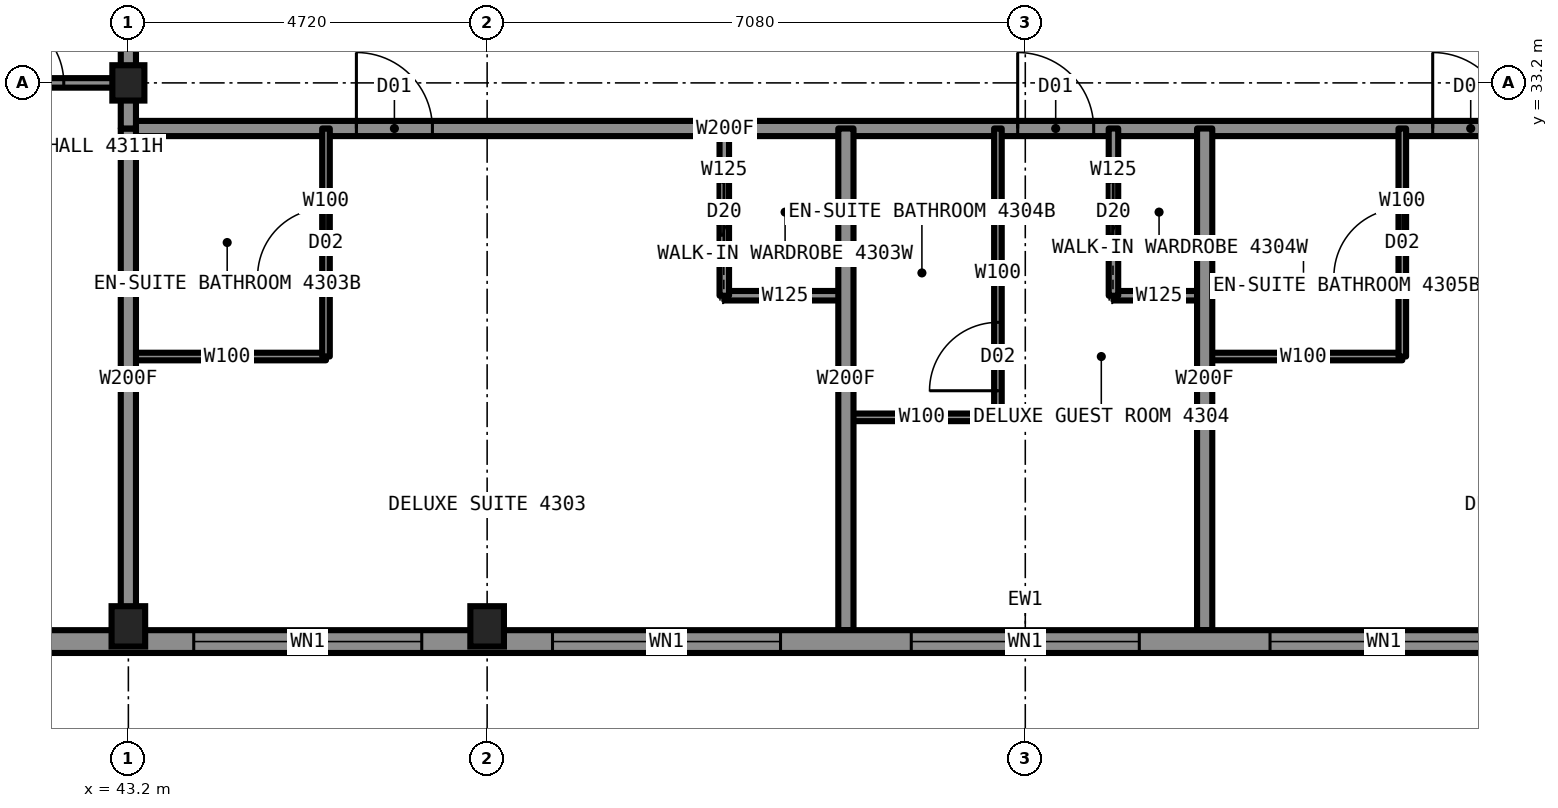
"""IFC4 building model, lengths in metres.
Left out: names, types, materials, properties, quantities, classifications, styles, units other than length and angle.
Written with IfcOpenShell. Run it as: python <this file> out.ifc"""

import sys

from ifc_helpers import new_model, si_unit, direction, frame, frame_2d, origin, origin_2d, place, context, subcontext, project, spatial, rectangle, i_section, extrude, element, fill, save


model = new_model("IFC4")
c1 = context("Model", 3, precision=1e-05, world=origin(), true_north=direction((0.0, 1.0)))
c2 = subcontext(c1, "Body", "Model", "MODEL_VIEW")
j1 = project(units=[si_unit("LENGTHUNIT", "METRE"), si_unit("PLANEANGLEUNIT", "RADIAN")], contexts=[c1])
p1 = place(None, origin())
s1 = spatial("IfcSite", under=j1, at=p1, CompositionType="ELEMENT")
p2 = place(p1, origin())
s2 = spatial("IfcBuilding", under=s1, at=p2, CompositionType="ELEMENT")
p3 = place(p2, frame((0.0, 0.0, 161.8)))
s3 = spatial("IfcBuildingStorey", under=s2, at=p3, CompositionType="ELEMENT", Elevation=161.8)
for number, where, z_axis, x_axis in (
    (1, (43.2, 26.05, 0.0), (0.0, 0.0, 1.0), (1.0, 0.0, 0.0)),
    (2, (47.92, 26.05, 0.0), (0.0, 0.0, 1.0), (1.0, 0.0, 0.0)),
):
    element("IfcColumn", number, at=place(p3, frame(where, z_axis=z_axis, x_axis=x_axis)), inside=s3, PredefinedType="COLUMN", context=c2, shape_type="SweptSolid", body=[
        extrude(i_section(OverallWidth=0.442, OverallDepth=0.531, WebThickness=0.066, FlangeThickness=0.106, at=origin_2d()), origin(), (0.0, 0.0, 1.0), 3.5),
    ])
p4 = place(p3, frame((43.2, 33.2, 0.0), z_axis=(0.0, 0.0, 1.0), x_axis=(1.0, 0.0, 0.0)))
e3 = element("IfcColumn", 3, at=p4, inside=s3, PredefinedType="COLUMN", context=c2, shape_type="SweptSolid", body=[
    extrude(i_section(OverallWidth=0.422, OverallDepth=0.465, WebThickness=0.045, FlangeThickness=0.073, at=origin_2d()), origin(), (0.0, 0.0, 1.0), 3.5),
])
p5 = place(p3, frame((36.0, 33.2, 0.0), z_axis=(0.0, 0.0, 1.0), x_axis=(1.0, 0.0, 0.0)))
e4 = element("IfcWall", 4, at=p5, inside=s3, PredefinedType="PARTITIONING", context=c2, shape_type="SweptSolid", body=[
    extrude(rectangle(XDim=7.2, YDim=0.125, at=frame_2d((3.6, 0.0))), origin(), (0.0, 0.0, 1.0), 2.573),
])
p6 = place(p5, frame((5.45, 0.0, 0.0)))
e5 = element("IfcOpeningElement", 5, at=p6, cuts=e4, PredefinedType="OPENING", context=c2, shape_type="SweptSolid", body=[
    extrude(rectangle(XDim=0.9, YDim=2.2, at=frame_2d((0.45, 1.1))), frame((0.0, 0.073, 0.0), z_axis=(0.0, -1.0, 0.0), x_axis=(1.0, 0.0, 0.0)), (0.0, 0.0, 1.0), 0.145),
])
p7 = place(p3, frame((43.2, 32.6, 0.0), z_axis=(0.0, 0.0, 1.0), x_axis=(1.0, 0.0, 0.0)))
e6 = element("IfcWall", 6, at=p7, inside=s3, PredefinedType="PARTITIONING", context=c2, shape_type="SweptSolid", body=[
    extrude(rectangle(XDim=23.6, YDim=0.2, at=frame_2d((11.8, 0.0))), origin(), (0.0, 0.0, 1.0), 3.33),
])
p8 = place(p7, frame((3.0, 0.0, 0.0)))
e7 = element("IfcOpeningElement", 7, at=p8, cuts=e6, PredefinedType="OPENING", context=c2, shape_type="SweptSolid", body=[
    extrude(rectangle(XDim=1.0, YDim=2.2, at=frame_2d((0.5, 1.1))), frame((0.0, 0.11, 0.0), z_axis=(0.0, -1.0, 0.0), x_axis=(1.0, 0.0, 0.0)), (0.0, 0.0, 1.0), 0.22),
])
p9 = place(p7, frame((11.7, 0.0, 0.0)))
e8 = element("IfcOpeningElement", 8, at=p9, cuts=e6, PredefinedType="OPENING", context=c2, shape_type="SweptSolid", body=[
    extrude(rectangle(XDim=1.0, YDim=2.2, at=frame_2d((0.5, 1.1))), frame((0.0, 0.11, 0.0), z_axis=(0.0, -1.0, 0.0), x_axis=(1.0, 0.0, 0.0)), (0.0, 0.0, 1.0), 0.22),
])
p10 = place(p7, frame((17.16, 0.0, 0.0)))
e9 = element("IfcOpeningElement", 9, at=p10, cuts=e6, PredefinedType="OPENING", context=c2, shape_type="SweptSolid", body=[
    extrude(rectangle(XDim=1.0, YDim=2.2, at=frame_2d((0.5, 1.1))), frame((0.0, 0.11, 0.0), z_axis=(0.0, -1.0, 0.0), x_axis=(1.0, 0.0, 0.0)), (0.0, 0.0, 1.0), 0.22),
])
p11 = place(p3, frame((51.04, 30.4, 0.0), z_axis=(0.0, 0.0, 1.0), x_axis=(1.0, 0.0, 0.0)))
e10 = element("IfcWall", 10, at=p11, inside=s3, PredefinedType="PARTITIONING", context=c2, shape_type="SweptSolid", body=[
    extrude(rectangle(XDim=1.6, YDim=0.125, at=frame_2d((0.8, 0.0))), origin(), (0.0, 0.0, 1.0), 3.33),
])
p12 = place(p3, frame((56.16, 30.4, 0.0), z_axis=(0.0, 0.0, 1.0), x_axis=(1.0, 0.0, 0.0)))
e11 = element("IfcWall", 11, at=p12, inside=s3, PredefinedType="PARTITIONING", context=c2, shape_type="SweptSolid", body=[
    extrude(rectangle(XDim=1.2, YDim=0.125, at=frame_2d((0.6, 0.0))), origin(), (0.0, 0.0, 1.0), 3.33),
])
p13 = place(p3, frame((43.2, 29.6, 0.0), z_axis=(0.0, 0.0, 1.0), x_axis=(1.0, 0.0, 0.0)))
e12 = element("IfcWall", 12, at=p13, inside=s3, PredefinedType="PARTITIONING", context=c2, shape_type="SweptSolid", body=[
    extrude(rectangle(XDim=2.6, YDim=0.1, at=frame_2d((1.3, 0.0))), origin(), (0.0, 0.0, 1.0), 3.33),
])
p14 = place(p3, frame((57.36, 29.6, 0.0), z_axis=(0.0, 0.0, 1.0), x_axis=(1.0, 0.0, 0.0)))
e13 = element("IfcWall", 13, at=p14, inside=s3, PredefinedType="PARTITIONING", context=c2, shape_type="SweptSolid", body=[
    extrude(rectangle(XDim=2.6, YDim=0.1, at=frame_2d((1.3, 0.0))), origin(), (0.0, 0.0, 1.0), 3.33),
])
p15 = place(p3, frame((52.64, 28.8, 0.0), z_axis=(0.0, 0.0, 1.0), x_axis=(1.0, 0.0, 0.0)))
e14 = element("IfcWall", 14, at=p15, inside=s3, PredefinedType="PARTITIONING", context=c2, shape_type="SweptSolid", body=[
    extrude(rectangle(XDim=2.0, YDim=0.1, at=frame_2d((1.0, 0.0))), origin(), (0.0, 0.0, 1.0), 3.33),
])
p16 = place(p3, frame((54.64, 28.8, 0.0), z_axis=(0.0, 0.0, 1.0), x_axis=(0.0, 1.0, 0.0)))
e15 = element("IfcWall", 15, at=p16, inside=s3, PredefinedType="PARTITIONING", context=c2, shape_type="SweptSolid", body=[
    extrude(rectangle(XDim=3.8, YDim=0.1, at=frame_2d((1.9, 0.0))), origin(), (0.0, 0.0, 1.0), 3.33),
])
p17 = place(p16, frame((0.35, 0.0, 0.0)))
e16 = element("IfcOpeningElement", 16, at=p17, cuts=e15, PredefinedType="OPENING", context=c2, shape_type="SweptSolid", body=[
    extrude(rectangle(XDim=0.9, YDim=2.1, at=frame_2d((0.45, 1.05))), frame((0.0, 0.06, 0.0), z_axis=(0.0, -1.0, 0.0), x_axis=(1.0, 0.0, 0.0)), (0.0, 0.0, 1.0), 0.12),
])
p18 = place(p3, frame((43.2, 33.22, 0.0), z_axis=(0.0, 0.0, 1.0), x_axis=(0.0, 1.0, 0.0)))
e17 = element("IfcWall", 17, at=p18, inside=s3, PredefinedType="PARTITIONING", context=c2, shape_type="SweptSolid", body=[
    extrude(rectangle(XDim=23.56, YDim=0.2, at=frame_2d((11.78, 0.0))), origin(), (0.0, 0.0, 1.0), 3.33),
])
p19 = place(p18, frame((15.6, 0.0, 0.0)))
e18 = element("IfcOpeningElement", 18, at=p19, cuts=e17, PredefinedType="OPENING", context=c2, shape_type="SweptSolid", body=[
    extrude(rectangle(XDim=1.0, YDim=2.2, at=frame_2d((0.5, 1.1))), frame((0.0, 0.11, 0.0), z_axis=(0.0, -1.0, 0.0), x_axis=(1.0, 0.0, 0.0)), (0.0, 0.0, 1.0), 0.22),
])
p20 = place(p18, frame((22.03, 0.0, 0.0)))
e19 = element("IfcOpeningElement", 19, at=p20, cuts=e17, PredefinedType="OPENING", context=c2, shape_type="SweptSolid", body=[
    extrude(rectangle(XDim=1.1, YDim=2.2, at=frame_2d((0.55, 1.1))), frame((0.0, 0.11, 0.0), z_axis=(0.0, -1.0, 0.0), x_axis=(1.0, 0.0, 0.0)), (0.0, 0.0, 1.0), 0.22),
])
p21 = place(p18, frame((0.64, 0.0, 0.0)))
e20 = element("IfcOpeningElement", 20, at=p21, cuts=e17, PredefinedType="OPENING", context=c2, shape_type="SweptSolid", body=[
    extrude(rectangle(XDim=1.1, YDim=2.2, at=frame_2d((0.55, 1.1))), frame((0.0, 0.11, 0.0), z_axis=(0.0, -1.0, 0.0), x_axis=(1.0, 0.0, 0.0)), (0.0, 0.0, 1.0), 0.22),
])
p22 = place(p18, frame((7.45, 0.0, 0.0)))
e21 = element("IfcOpeningElement", 21, at=p22, cuts=e17, PredefinedType="OPENING", context=c2, shape_type="SweptSolid", body=[
    extrude(rectangle(XDim=2.0, YDim=2.4, at=frame_2d((1.0, 1.2))), frame((0.0, 0.11, 0.0), z_axis=(0.0, -1.0, 0.0), x_axis=(1.0, 0.0, 0.0)), (0.0, 0.0, 1.0), 0.22),
])
p23 = place(p18, frame((5.4, 0.0, 0.0)))
e22 = element("IfcOpeningElement", 22, at=p23, cuts=e17, PredefinedType="OPENING", context=c2, shape_type="SweptSolid", body=[
    extrude(rectangle(XDim=1.0, YDim=2.1, at=frame_2d((0.5, 1.05))), frame((0.0, 0.11, 0.0), z_axis=(0.0, -1.0, 0.0), x_axis=(1.0, 0.0, 0.0)), (0.0, 0.0, 1.0), 0.22),
])
p24 = place(p3, frame((43.2, 26.0, 0.0), z_axis=(0.0, 0.0, 1.0), x_axis=(0.0, 1.0, 0.0)))
e23 = element("IfcWall", 23, at=p24, inside=s3, PredefinedType="PARTITIONING", context=c2, shape_type="SweptSolid", body=[
    extrude(rectangle(XDim=6.6, YDim=0.2, at=frame_2d((3.3, 0.0))), origin(), (0.0, 0.0, 1.0), 2.573),
])
p25 = place(p3, frame((52.64, 26.0, 0.0), z_axis=(0.0, 0.0, 1.0), x_axis=(0.0, 1.0, 0.0)))
e24 = element("IfcWall", 24, at=p25, inside=s3, PredefinedType="PARTITIONING", context=c2, shape_type="SweptSolid", body=[
    extrude(rectangle(XDim=6.6, YDim=0.2, at=frame_2d((3.3, 0.0))), origin(), (0.0, 0.0, 1.0), 3.33),
])
p26 = place(p3, frame((51.04, 30.4, 0.0), z_axis=(0.0, 0.0, 1.0), x_axis=(0.0, 1.0, 0.0)))
e25 = element("IfcWall", 25, at=p26, inside=s3, PredefinedType="PARTITIONING", context=c2, shape_type="SweptSolid", body=[
    extrude(rectangle(XDim=2.2, YDim=0.125, at=frame_2d((1.1, 0.0))), origin(), (0.0, 0.0, 1.0), 3.33),
])
p27 = place(p26, frame((0.7, 0.0, 0.0)))
e26 = element("IfcOpeningElement", 26, at=p27, cuts=e25, PredefinedType="OPENING", context=c2, shape_type="SweptSolid", body=[
    extrude(rectangle(XDim=0.8, YDim=2.1, at=frame_2d((0.4, 1.05))), frame((0.0, 0.073, 0.0), z_axis=(0.0, -1.0, 0.0), x_axis=(1.0, 0.0, 0.0)), (0.0, 0.0, 1.0), 0.145),
])
p28 = place(p3, frame((45.8, 29.6, 0.0), z_axis=(0.0, 0.0, 1.0), x_axis=(0.0, 1.0, 0.0)))
e27 = element("IfcWall", 27, at=p28, inside=s3, PredefinedType="PARTITIONING", context=c2, shape_type="SweptSolid", body=[
    extrude(rectangle(XDim=3.0, YDim=0.1, at=frame_2d((1.5, 0.0))), origin(), (0.0, 0.0, 1.0), 3.33),
])
p29 = place(p28, frame((1.05, 0.0, 0.0)))
e28 = element("IfcOpeningElement", 28, at=p29, cuts=e27, PredefinedType="OPENING", context=c2, shape_type="SweptSolid", body=[
    extrude(rectangle(XDim=0.9, YDim=2.1, at=frame_2d((0.45, 1.05))), frame((0.0, 0.06, 0.0), z_axis=(0.0, -1.0, 0.0), x_axis=(1.0, 0.0, 0.0)), (0.0, 0.0, 1.0), 0.12),
])
p30 = place(p3, frame((56.16, 30.4, 0.0), z_axis=(0.0, 0.0, 1.0), x_axis=(0.0, 1.0, 0.0)))
e29 = element("IfcWall", 29, at=p30, inside=s3, PredefinedType="PARTITIONING", context=c2, shape_type="SweptSolid", body=[
    extrude(rectangle(XDim=2.2, YDim=0.125, at=frame_2d((1.1, 0.0))), origin(), (0.0, 0.0, 1.0), 3.33),
])
p31 = place(p30, frame((0.7, 0.0, 0.0)))
e30 = element("IfcOpeningElement", 30, at=p31, cuts=e29, PredefinedType="OPENING", context=c2, shape_type="SweptSolid", body=[
    extrude(rectangle(XDim=0.8, YDim=2.1, at=frame_2d((0.4, 1.05))), frame((0.0, 0.073, 0.0), z_axis=(0.0, -1.0, 0.0), x_axis=(1.0, 0.0, 0.0)), (0.0, 0.0, 1.0), 0.145),
])
p32 = place(p3, frame((57.36, 26.0, 0.0), z_axis=(0.0, 0.0, 1.0), x_axis=(0.0, 1.0, 0.0)))
e31 = element("IfcWall", 31, at=p32, inside=s3, PredefinedType="PARTITIONING", context=c2, shape_type="SweptSolid", body=[
    extrude(rectangle(XDim=6.6, YDim=0.2, at=frame_2d((3.3, 0.0))), origin(), (0.0, 0.0, 1.0), 3.33),
])
p33 = place(p3, frame((59.96, 29.6, 0.0), z_axis=(0.0, 0.0, 1.0), x_axis=(0.0, 1.0, 0.0)))
e32 = element("IfcWall", 32, at=p33, inside=s3, PredefinedType="PARTITIONING", context=c2, shape_type="SweptSolid", body=[
    extrude(rectangle(XDim=3.0, YDim=0.1, at=frame_2d((1.5, 0.0))), origin(), (0.0, 0.0, 1.0), 3.33),
])
p34 = place(p33, frame((1.05, 0.0, 0.0)))
e33 = element("IfcOpeningElement", 33, at=p34, cuts=e32, PredefinedType="OPENING", context=c2, shape_type="SweptSolid", body=[
    extrude(rectangle(XDim=0.9, YDim=2.1, at=frame_2d((0.45, 1.05))), frame((0.0, 0.06, 0.0), z_axis=(0.0, -1.0, 0.0), x_axis=(1.0, 0.0, 0.0)), (0.0, 0.0, 1.0), 0.12),
])
p35 = place(p3, frame((41.2, 25.85, 0.0), z_axis=(0.0, 0.0, 1.0), x_axis=(1.0, 0.0, 0.0)))
e34 = element("IfcWall", 34, at=p35, inside=s3, PredefinedType="SOLIDWALL", context=c2, shape_type="SweptSolid", body=[
    extrude(rectangle(XDim=27.6, YDim=0.3, at=frame_2d((13.8, 0.0))), origin(), (0.0, 0.0, 1.0), 2.83),
])
p36 = place(p35, frame((2.86, 0.0, 0.3)))
e35 = element("IfcOpeningElement", 35, at=p36, cuts=e34, PredefinedType="OPENING", context=c2, shape_type="SweptSolid", body=[
    extrude(rectangle(XDim=3.0, YDim=2.0, at=frame_2d((1.5, 1.0))), frame((0.0, 0.16, 0.0), z_axis=(0.0, -1.0, 0.0), x_axis=(1.0, 0.0, 0.0)), (0.0, 0.0, 1.0), 0.32),
])
p37 = place(p35, frame((7.58, 0.0, 0.3)))
e36 = element("IfcOpeningElement", 36, at=p37, cuts=e34, PredefinedType="OPENING", context=c2, shape_type="SweptSolid", body=[
    extrude(rectangle(XDim=3.0, YDim=2.0, at=frame_2d((1.5, 1.0))), frame((0.0, 0.16, 0.0), z_axis=(0.0, -1.0, 0.0), x_axis=(1.0, 0.0, 0.0)), (0.0, 0.0, 1.0), 0.32),
])
p38 = place(p35, frame((12.3, 0.0, 0.3)))
e37 = element("IfcOpeningElement", 37, at=p38, cuts=e34, PredefinedType="OPENING", context=c2, shape_type="SweptSolid", body=[
    extrude(rectangle(XDim=3.0, YDim=2.0, at=frame_2d((1.5, 1.0))), frame((0.0, 0.16, 0.0), z_axis=(0.0, -1.0, 0.0), x_axis=(1.0, 0.0, 0.0)), (0.0, 0.0, 1.0), 0.32),
])
p39 = place(p35, frame((17.02, 0.0, 0.3)))
e38 = element("IfcOpeningElement", 38, at=p39, cuts=e34, PredefinedType="OPENING", context=c2, shape_type="SweptSolid", body=[
    extrude(rectangle(XDim=3.0, YDim=2.0, at=frame_2d((1.5, 1.0))), frame((0.0, 0.16, 0.0), z_axis=(0.0, -1.0, 0.0), x_axis=(1.0, 0.0, 0.0)), (0.0, 0.0, 1.0), 0.32),
])
p40 = place(p35, frame((21.74, 0.0, 0.3)))
e39 = element("IfcOpeningElement", 39, at=p40, cuts=e34, PredefinedType="OPENING", context=c2, shape_type="SweptSolid", body=[
    extrude(rectangle(XDim=3.0, YDim=2.0, at=frame_2d((1.5, 1.0))), frame((0.0, 0.16, 0.0), z_axis=(0.0, -1.0, 0.0), x_axis=(1.0, 0.0, 0.0)), (0.0, 0.0, 1.0), 0.32),
])
p41 = place(p3, frame((43.2, 32.6, 0.0), z_axis=(0.0, 0.0, 1.0), x_axis=(0.0, 1.0, 0.0)))
e40 = element("IfcWall", 40, at=p41, inside=s3, PredefinedType="PARTITIONING", context=c2, shape_type="SweptSolid", body=[
    extrude(rectangle(XDim=0.62, YDim=0.2, at=frame_2d((0.31, 0.0))), origin(), (0.0, 0.0, 1.0), 2.573),
])
p42 = place(p8, origin())
e41 = element("IfcDoor", 41, at=p42, inside=s3, OperationType="SINGLE_SWING_LEFT", PredefinedType="DOOR", context=c2, shape_type="SweptSolid", body=[
    extrude(rectangle(XDim=1.0, YDim=2.2, at=frame_2d((0.5, 1.1))), frame((0.0, 0.025, 0.0), z_axis=(0.0, -1.0, 0.0), x_axis=(1.0, 0.0, 0.0)), (0.0, 0.0, 1.0), 0.05),
])
fill(e7, e41)
p43 = place(p29, origin())
e42 = element("IfcDoor", 42, at=p43, inside=s3, OperationType="SINGLE_SWING_RIGHT", PredefinedType="DOOR", context=c2, shape_type="SweptSolid", body=[
    extrude(rectangle(XDim=0.9, YDim=2.1, at=frame_2d((0.45, 1.05))), frame((0.0, 0.025, 0.0), z_axis=(0.0, -1.0, 0.0), x_axis=(1.0, 0.0, 0.0)), (0.0, 0.0, 1.0), 0.05),
])
fill(e28, e42)
p44 = place(p27, origin())
e43 = element("IfcDoor", 43, at=p44, inside=s3, OperationType="SLIDING_TO_LEFT", PredefinedType="DOOR", context=c2, shape_type="SweptSolid", body=[
    extrude(rectangle(XDim=0.8, YDim=2.1, at=frame_2d((0.4, 1.05))), frame((0.0, 0.025, 0.0), z_axis=(0.0, -1.0, 0.0), x_axis=(1.0, 0.0, 0.0)), (0.0, 0.0, 1.0), 0.05),
])
fill(e26, e43)
p45 = place(p9, origin())
e44 = element("IfcDoor", 44, at=p45, inside=s3, OperationType="SINGLE_SWING_LEFT", PredefinedType="DOOR", context=c2, shape_type="SweptSolid", body=[
    extrude(rectangle(XDim=1.0, YDim=2.2, at=frame_2d((0.5, 1.1))), frame((0.0, 0.025, 0.0), z_axis=(0.0, -1.0, 0.0), x_axis=(1.0, 0.0, 0.0)), (0.0, 0.0, 1.0), 0.05),
])
fill(e8, e44)
p46 = place(p17, origin())
e45 = element("IfcDoor", 45, at=p46, inside=s3, OperationType="SINGLE_SWING_RIGHT", PredefinedType="DOOR", context=c2, shape_type="SweptSolid", body=[
    extrude(rectangle(XDim=0.9, YDim=2.1, at=frame_2d((0.45, 1.05))), frame((0.0, 0.025, 0.0), z_axis=(0.0, -1.0, 0.0), x_axis=(1.0, 0.0, 0.0)), (0.0, 0.0, 1.0), 0.05),
])
fill(e16, e45)
p47 = place(p31, origin())
e46 = element("IfcDoor", 46, at=p47, inside=s3, OperationType="SLIDING_TO_LEFT", PredefinedType="DOOR", context=c2, shape_type="SweptSolid", body=[
    extrude(rectangle(XDim=0.8, YDim=2.1, at=frame_2d((0.4, 1.05))), frame((0.0, 0.025, 0.0), z_axis=(0.0, -1.0, 0.0), x_axis=(1.0, 0.0, 0.0)), (0.0, 0.0, 1.0), 0.05),
])
fill(e30, e46)
p48 = place(p10, origin())
e47 = element("IfcDoor", 47, at=p48, inside=s3, OperationType="SINGLE_SWING_LEFT", PredefinedType="DOOR", context=c2, shape_type="SweptSolid", body=[
    extrude(rectangle(XDim=1.0, YDim=2.2, at=frame_2d((0.5, 1.1))), frame((0.0, 0.025, 0.0), z_axis=(0.0, -1.0, 0.0), x_axis=(1.0, 0.0, 0.0)), (0.0, 0.0, 1.0), 0.05),
])
fill(e9, e47)
p49 = place(p34, origin())
e48 = element("IfcDoor", 48, at=p49, inside=s3, OperationType="SINGLE_SWING_RIGHT", PredefinedType="DOOR", context=c2, shape_type="SweptSolid", body=[
    extrude(rectangle(XDim=0.9, YDim=2.1, at=frame_2d((0.45, 1.05))), frame((0.0, 0.025, 0.0), z_axis=(0.0, -1.0, 0.0), x_axis=(1.0, 0.0, 0.0)), (0.0, 0.0, 1.0), 0.05),
])
fill(e33, e48)
p50 = place(p6, origin())
e49 = element("IfcDoor", 49, at=p50, inside=s3, OperationType="SINGLE_SWING_LEFT", PredefinedType="DOOR", context=c2, shape_type="SweptSolid", body=[
    extrude(rectangle(XDim=0.9, YDim=2.2, at=frame_2d((0.45, 1.1))), frame((0.0, 0.025, 0.0), z_axis=(0.0, -1.0, 0.0), x_axis=(1.0, 0.0, 0.0)), (0.0, 0.0, 1.0), 0.05),
])
fill(e5, e49)
p51 = place(p36, origin())
e50 = element("IfcWindow", 50, at=p51, inside=s3, PartitioningType="SINGLE_PANEL", PredefinedType="WINDOW", context=c2, shape_type="SweptSolid", body=[
    extrude(rectangle(XDim=3.0, YDim=2.0, at=frame_2d((1.5, 1.0))), frame((0.0, 0.13, 0.0), z_axis=(0.0, -1.0, 0.0), x_axis=(1.0, 0.0, 0.0)), (0.0, 0.0, 1.0), 0.06),
])
fill(e35, e50)
p52 = place(p37, origin())
e51 = element("IfcWindow", 51, at=p52, inside=s3, PartitioningType="SINGLE_PANEL", PredefinedType="WINDOW", context=c2, shape_type="SweptSolid", body=[
    extrude(rectangle(XDim=3.0, YDim=2.0, at=frame_2d((1.5, 1.0))), frame((0.0, 0.13, 0.0), z_axis=(0.0, -1.0, 0.0), x_axis=(1.0, 0.0, 0.0)), (0.0, 0.0, 1.0), 0.06),
])
fill(e36, e51)
p53 = place(p38, origin())
e52 = element("IfcWindow", 52, at=p53, inside=s3, PartitioningType="SINGLE_PANEL", PredefinedType="WINDOW", context=c2, shape_type="SweptSolid", body=[
    extrude(rectangle(XDim=3.0, YDim=2.0, at=frame_2d((1.5, 1.0))), frame((0.0, 0.13, 0.0), z_axis=(0.0, -1.0, 0.0), x_axis=(1.0, 0.0, 0.0)), (0.0, 0.0, 1.0), 0.06),
])
fill(e37, e52)
p54 = place(p39, origin())
e53 = element("IfcWindow", 53, at=p54, inside=s3, PartitioningType="SINGLE_PANEL", PredefinedType="WINDOW", context=c2, shape_type="SweptSolid", body=[
    extrude(rectangle(XDim=3.0, YDim=2.0, at=frame_2d((1.5, 1.0))), frame((0.0, 0.13, 0.0), z_axis=(0.0, -1.0, 0.0), x_axis=(1.0, 0.0, 0.0)), (0.0, 0.0, 1.0), 0.06),
])
fill(e38, e53)
save(model, sys.argv[1])
